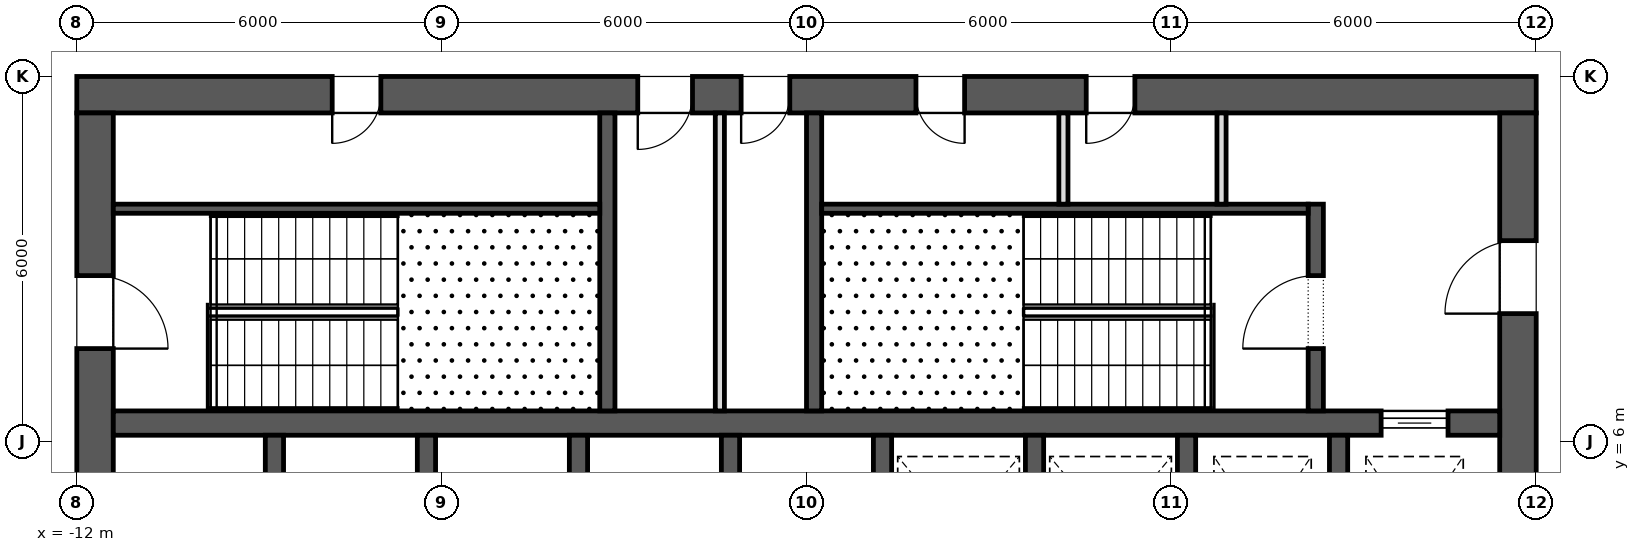
"""IFC4 building model, lengths in metres.
Left out: names, types, materials, properties, quantities, classifications, styles, units other than length and angle.
Written with IfcOpenShell. Run it as: python <this file> out.ifc"""

import sys

from ifc_helpers import new_model, si_unit, direction, frame, frame_2d, origin, place, context, subcontext, project, spatial, rectangle, extrude, element, fill, save


model = new_model("IFC4")
c1 = context("Model", 3, precision=1e-05, world=origin(), true_north=direction((0.0, 1.0)))
c2 = subcontext(c1, "Body", "Model", "MODEL_VIEW")
j1 = project(units=[si_unit("LENGTHUNIT", "METRE"), si_unit("PLANEANGLEUNIT", "RADIAN")], contexts=[c1])
p1 = place(None, origin())
s1 = spatial("IfcSite", under=j1, at=p1, CompositionType="ELEMENT")
p2 = place(p1, origin())
s2 = spatial("IfcBuilding", under=s1, at=p2, CompositionType="ELEMENT")
p3 = place(p2, frame((0.0, 0.0, 86.5)))
s3 = spatial("IfcBuildingStorey", under=s2, at=p3, CompositionType="ELEMENT", Elevation=86.5)
p4 = place(p3, frame((-12.0, 11.7, 0.0), z_axis=(0.0, 0.0, 1.0), x_axis=(1.0, 0.0, 0.0)))
e1 = element("IfcWall", 1, at=p4, inside=s3, PredefinedType="SHEAR", context=c2, shape_type="SweptSolid", body=[
    extrude(rectangle(XDim=24.0, YDim=0.6, at=frame_2d((12.0, 0.0))), origin(), (0.0, 0.0, 1.0), 4.2),
])
p5 = place(p4, frame((9.225, 0.0, 0.0)))
e2 = element("IfcOpeningElement", 2, at=p5, cuts=e1, PredefinedType="OPENING", context=c2, shape_type="SweptSolid", body=[
    extrude(rectangle(XDim=0.9, YDim=2.1, at=frame_2d((0.45, 1.05))), frame((0.0, 0.312, 0.0), z_axis=(0.0, -1.0, 0.0), x_axis=(1.0, 0.0, 0.0)), (0.0, 0.0, 1.0), 0.624),
])
p6 = place(p4, frame((10.925, 0.0, 0.0)))
e3 = element("IfcOpeningElement", 3, at=p6, cuts=e1, PredefinedType="OPENING", context=c2, shape_type="SweptSolid", body=[
    extrude(rectangle(XDim=0.8, YDim=2.1, at=frame_2d((0.4, 1.05))), frame((0.0, 0.312, 0.0), z_axis=(0.0, -1.0, 0.0), x_axis=(1.0, 0.0, 0.0)), (0.0, 0.0, 1.0), 0.624),
])
p7 = place(p4, frame((4.2, 0.0, 0.0)))
e4 = element("IfcOpeningElement", 4, at=p7, cuts=e1, PredefinedType="OPENING", context=c2, shape_type="SweptSolid", body=[
    extrude(rectangle(XDim=0.8, YDim=2.1, at=frame_2d((0.4, 1.05))), frame((0.0, 0.312, 0.0), z_axis=(0.0, -1.0, 0.0), x_axis=(1.0, 0.0, 0.0)), (0.0, 0.0, 1.0), 0.624),
])
p8 = place(p4, frame((13.8, 0.0, 0.0)))
e5 = element("IfcOpeningElement", 5, at=p8, cuts=e1, PredefinedType="OPENING", context=c2, shape_type="SweptSolid", body=[
    extrude(rectangle(XDim=0.8, YDim=2.1, at=frame_2d((0.4, 1.05))), frame((0.0, 0.312, 0.0), z_axis=(0.0, -1.0, 0.0), x_axis=(1.0, 0.0, 0.0)), (0.0, 0.0, 1.0), 0.624),
])
p9 = place(p4, frame((16.6, 0.0, 0.0)))
e6 = element("IfcOpeningElement", 6, at=p9, cuts=e1, PredefinedType="OPENING", context=c2, shape_type="SweptSolid", body=[
    extrude(rectangle(XDim=0.8, YDim=2.1, at=frame_2d((0.4, 1.05))), frame((0.0, 0.312, 0.0), z_axis=(0.0, -1.0, 0.0), x_axis=(1.0, 0.0, 0.0)), (0.0, 0.0, 1.0), 0.624),
])
p10 = place(p3, frame((11.7, -11.4, 0.0), z_axis=(0.0, 0.0, 1.0), x_axis=(0.0, 1.0, 0.0)))
e7 = element("IfcWall", 7, at=p10, inside=s3, PredefinedType="SHEAR", context=c2, shape_type="SweptSolid", body=[
    extrude(rectangle(XDim=22.8, YDim=0.6, at=frame_2d((11.4, 0.0))), origin(), (0.0, 0.0, 1.0), 4.2),
])
p11 = place(p10, frame((10.2, 0.0, 0.0)))
e8 = element("IfcOpeningElement", 8, at=p11, cuts=e7, PredefinedType="OPENING", context=c2, shape_type="SweptSolid", body=[
    extrude(rectangle(XDim=2.4, YDim=2.1, at=frame_2d((1.2, 1.05))), frame((0.0, 0.312, 0.0), z_axis=(0.0, -1.0, 0.0), x_axis=(1.0, 0.0, 0.0)), (0.0, 0.0, 1.0), 0.624),
])
p12 = place(p10, frame((19.5, 0.0, 0.0)))
e9 = element("IfcOpeningElement", 9, at=p12, cuts=e7, PredefinedType="OPENING", context=c2, shape_type="SweptSolid", body=[
    extrude(rectangle(XDim=1.2, YDim=2.1, at=frame_2d((0.6, 1.05))), frame((0.0, 0.312, 0.0), z_axis=(0.0, -1.0, 0.0), x_axis=(1.0, 0.0, 0.0)), (0.0, 0.0, 1.0), 0.624),
])
p13 = place(p10, frame((2.1, 0.0, 0.0)))
e10 = element("IfcOpeningElement", 10, at=p13, cuts=e7, PredefinedType="OPENING", context=c2, shape_type="SweptSolid", body=[
    extrude(rectangle(XDim=1.2, YDim=2.1, at=frame_2d((0.6, 1.05))), frame((0.0, 0.312, 0.0), z_axis=(0.0, -1.0, 0.0), x_axis=(1.0, 0.0, 0.0)), (0.0, 0.0, 1.0), 0.624),
])
p14 = place(p3, frame((-11.7, -11.4, 0.0), z_axis=(0.0, 0.0, 1.0), x_axis=(0.0, 1.0, 0.0)))
e11 = element("IfcWall", 11, at=p14, inside=s3, PredefinedType="SHEAR", context=c2, shape_type="SweptSolid", body=[
    extrude(rectangle(XDim=22.8, YDim=0.6, at=frame_2d((11.4, 0.0))), origin(), (0.0, 0.0, 1.0), 4.2),
])
p15 = place(p14, frame((10.2, 0.0, 0.0)))
e12 = element("IfcOpeningElement", 12, at=p15, cuts=e11, PredefinedType="OPENING", context=c2, shape_type="SweptSolid", body=[
    extrude(rectangle(XDim=2.4, YDim=2.1, at=frame_2d((1.2, 1.05))), frame((0.0, 0.312, 0.0), z_axis=(0.0, -1.0, 0.0), x_axis=(1.0, 0.0, 0.0)), (0.0, 0.0, 1.0), 0.624),
])
p16 = place(p14, frame((18.925, 0.0, 0.0)))
e13 = element("IfcOpeningElement", 13, at=p16, cuts=e11, PredefinedType="OPENING", context=c2, shape_type="SweptSolid", body=[
    extrude(rectangle(XDim=1.2, YDim=2.1, at=frame_2d((0.6, 1.05))), frame((0.0, 0.312, 0.0), z_axis=(0.0, -1.0, 0.0), x_axis=(1.0, 0.0, 0.0)), (0.0, 0.0, 1.0), 0.624),
])
p17 = place(p14, frame((2.675, 0.0, 0.0)))
e14 = element("IfcOpeningElement", 14, at=p17, cuts=e11, PredefinedType="OPENING", context=c2, shape_type="SweptSolid", body=[
    extrude(rectangle(XDim=1.2, YDim=2.1, at=frame_2d((0.6, 1.05))), frame((0.0, 0.312, 0.0), z_axis=(0.0, -1.0, 0.0), x_axis=(1.0, 0.0, 0.0)), (0.0, 0.0, 1.0), 0.624),
])
p18 = place(p3, frame((-11.4, 6.3, 0.0), z_axis=(0.0, 0.0, 1.0), x_axis=(1.0, 0.0, 0.0)))
e15 = element("IfcWall", 15, at=p18, inside=s3, PredefinedType="SHEAR", context=c2, shape_type="SweptSolid", body=[
    extrude(rectangle(XDim=22.8, YDim=0.4, at=frame_2d((11.4, 0.0))), origin(), (0.0, 0.0, 1.0), 4.2),
])
p19 = place(p18, frame((20.85, 0.0, 0.0)))
e16 = element("IfcOpeningElement", 16, at=p19, cuts=e15, PredefinedType="OPENING", context=c2, shape_type="SweptSolid", body=[
    extrude(rectangle(XDim=1.1, YDim=2.1, at=frame_2d((0.55, 1.05))), frame((0.0, 0.212, 0.0), z_axis=(0.0, -1.0, 0.0), x_axis=(1.0, 0.0, 0.0)), (0.0, 0.0, 1.0), 0.424),
])
for number, where, z_axis, x_axis in (
    (17, (-8.75, 3.2, 0.0), (0.0, 0.0, 1.0), (0.0, 1.0, 0.0)),
    (18, (-6.25, 3.2, 0.0), (0.0, 0.0, 1.0), (0.0, 1.0, 0.0)),
    (19, (-3.75, 3.2, 0.0), (0.0, 0.0, 1.0), (0.0, 1.0, 0.0)),
    (20, (-1.25, 3.2, 0.0), (0.0, 0.0, 1.0), (0.0, 1.0, 0.0)),
    (21, (1.25, 3.2, 0.0), (0.0, 0.0, 1.0), (0.0, 1.0, 0.0)),
    (22, (3.75, 3.2, 0.0), (0.0, 0.0, 1.0), (0.0, 1.0, 0.0)),
    (23, (6.25, 3.2, 0.0), (0.0, 0.0, 1.0), (0.0, 1.0, 0.0)),
    (24, (8.75, 3.2, 0.0), (0.0, 0.0, 1.0), (0.0, 1.0, 0.0)),
):
    element("IfcWall", number, at=place(p3, frame(where, z_axis=z_axis, x_axis=x_axis)), inside=s3, PredefinedType="SHEAR", context=c2, shape_type="SweptSolid", body=[
        extrude(rectangle(XDim=2.9, YDim=0.3, at=frame_2d((1.45, 0.0))), origin(), (0.0, 0.0, 1.0), 4.2),
    ])
for number, where, z_axis, x_axis in (
    (25, (-3.275, 6.5, 0.0), (0.0, 0.0, 1.0), (0.0, 1.0, 0.0)),
    (26, (0.125, 6.5, 0.0), (0.0, 0.0, 1.0), (0.0, 1.0, 0.0)),
):
    element("IfcWall", number, at=place(p3, frame(where, z_axis=z_axis, x_axis=x_axis)), inside=s3, PredefinedType="SHEAR", context=c2, shape_type="SweptSolid", body=[
        extrude(rectangle(XDim=4.9, YDim=0.25, at=frame_2d((2.45, 0.0))), origin(), (0.0, 0.0, 1.0), 3.9),
    ])
p20 = place(p3, frame((8.375, 6.5, 0.0), z_axis=(0.0, 0.0, 1.0), x_axis=(0.0, 1.0, 0.0)))
e27 = element("IfcWall", 27, at=p20, inside=s3, PredefinedType="SHEAR", context=c2, shape_type="SweptSolid", body=[
    extrude(rectangle(XDim=3.4, YDim=0.25, at=frame_2d((1.7, 0.0))), origin(), (0.0, 0.0, 1.0), 3.9),
])
p21 = place(p20, frame((1.025, 0.0, 0.0)))
e28 = element("IfcOpeningElement", 28, at=p21, cuts=e27, PredefinedType="OPENING", context=c2, shape_type="SweptSolid", body=[
    extrude(rectangle(XDim=1.2, YDim=2.1, at=frame_2d((0.6, 1.05))), frame((0.0, 0.137, 0.0), z_axis=(0.0, -1.0, 0.0), x_axis=(1.0, 0.0, 0.0)), (0.0, 0.0, 1.0), 0.274),
])
for number, where, z_axis, x_axis in (
    (29, (-11.4, 9.825, 0.0), (0.0, 0.0, 1.0), (1.0, 0.0, 0.0)),
    (30, (0.25, 9.825, 0.0), (0.0, 0.0, 1.0), (1.0, 0.0, 0.0)),
):
    element("IfcWall", number, at=place(p3, frame(where, z_axis=z_axis, x_axis=x_axis)), inside=s3, PredefinedType="SHEAR", context=c2, shape_type="SweptSolid", body=[
        extrude(rectangle(XDim=8.0, YDim=0.15, at=frame_2d((4.0, 0.0))), origin(), (0.0, 0.0, 1.0), 3.9),
    ])
p22 = place(p3, frame((-1.425, 6.5, 0.0), z_axis=(0.0, 0.0, 1.0), x_axis=(0.0, 1.0, 0.0)))
e31 = element("IfcWall", 31, at=p22, inside=s3, PredefinedType="PARTITIONING", context=c2, shape_type="SweptSolid", body=[
    extrude(rectangle(XDim=4.9, YDim=0.15, at=frame_2d((2.45, 0.0))), origin(), (0.0, 0.0, 1.0), 3.9),
])
for number, where, z_axis, x_axis in (
    (32, (4.225, 9.9, 0.0), (0.0, 0.0, 1.0), (0.0, 1.0, 0.0)),
    (33, (6.825, 9.9, 0.0), (0.0, 0.0, 1.0), (0.0, 1.0, 0.0)),
):
    element("IfcWall", number, at=place(p3, frame(where, z_axis=z_axis, x_axis=x_axis)), inside=s3, PredefinedType="PARTITIONING", context=c2, shape_type="SweptSolid", body=[
        extrude(rectangle(XDim=1.5, YDim=0.15, at=frame_2d((0.75, 0.0))), origin(), (0.0, 0.0, 1.0), 3.9),
    ])
p23 = place(p19, origin())
e34 = element("IfcDoor", 34, at=p23, inside=s3, OperationType="SLIDING_TO_LEFT", PredefinedType="DOOR", context=c2, shape_type="SweptSolid", body=[
    extrude(rectangle(XDim=1.1, YDim=2.1, at=frame_2d((0.55, 1.05))), frame((0.0, 0.025, 0.0), z_axis=(0.0, -1.0, 0.0), x_axis=(1.0, 0.0, 0.0)), (0.0, 0.0, 1.0), 0.05),
])
fill(e16, e34)
p24 = place(p16, frame((1.2, 0.0, 0.0), z_axis=(0.0, 0.0, 1.0), x_axis=(-1.0, 0.0, 0.0)))
e35 = element("IfcDoor", 35, at=p24, inside=s3, OperationType="SINGLE_SWING_LEFT", PredefinedType="DOOR", context=c2, shape_type="SweptSolid", body=[
    extrude(rectangle(XDim=1.2, YDim=2.1, at=frame_2d((0.6, 1.05))), frame((0.0, 0.025, 0.0), z_axis=(0.0, -1.0, 0.0), x_axis=(1.0, 0.0, 0.0)), (0.0, 0.0, 1.0), 0.05),
])
fill(e13, e35)
p25 = place(p21, origin())
e36 = element("IfcDoor", 36, at=p25, inside=s3, OperationType="SINGLE_SWING_RIGHT", PredefinedType="DOOR", context=c2, shape_type="SweptSolid", body=[
    extrude(rectangle(XDim=1.2, YDim=2.1, at=frame_2d((0.6, 1.05))), frame((0.0, 0.025, 0.0), z_axis=(0.0, -1.0, 0.0), x_axis=(1.0, 0.0, 0.0)), (0.0, 0.0, 1.0), 0.05),
])
fill(e28, e36)
p26 = place(p12, origin())
e37 = element("IfcDoor", 37, at=p26, inside=s3, OperationType="SINGLE_SWING_RIGHT", PredefinedType="DOOR", context=c2, shape_type="SweptSolid", body=[
    extrude(rectangle(XDim=1.2, YDim=2.1, at=frame_2d((0.6, 1.05))), frame((0.0, 0.025, 0.0), z_axis=(0.0, -1.0, 0.0), x_axis=(1.0, 0.0, 0.0)), (0.0, 0.0, 1.0), 0.05),
])
fill(e9, e37)
p27 = place(p5, frame((0.9, 0.0, 0.0), z_axis=(0.0, 0.0, 1.0), x_axis=(-1.0, 0.0, 0.0)))
e38 = element("IfcDoor", 38, at=p27, inside=s3, OperationType="SINGLE_SWING_LEFT", PredefinedType="DOOR", context=c2, shape_type="SweptSolid", body=[
    extrude(rectangle(XDim=0.9, YDim=2.1, at=frame_2d((0.45, 1.05))), frame((0.0, 0.025, 0.0), z_axis=(0.0, -1.0, 0.0), x_axis=(1.0, 0.0, 0.0)), (0.0, 0.0, 1.0), 0.05),
])
fill(e2, e38)
p28 = place(p6, frame((0.8, 0.0, 0.0), z_axis=(0.0, 0.0, 1.0), x_axis=(-1.0, 0.0, 0.0)))
e39 = element("IfcDoor", 39, at=p28, inside=s3, OperationType="SINGLE_SWING_LEFT", PredefinedType="DOOR", context=c2, shape_type="SweptSolid", body=[
    extrude(rectangle(XDim=0.8, YDim=2.1, at=frame_2d((0.4, 1.05))), frame((0.0, 0.025, 0.0), z_axis=(0.0, -1.0, 0.0), x_axis=(1.0, 0.0, 0.0)), (0.0, 0.0, 1.0), 0.05),
])
fill(e3, e39)
p29 = place(p7, frame((0.8, 0.0, 0.0), z_axis=(0.0, 0.0, 1.0), x_axis=(-1.0, 0.0, 0.0)))
e40 = element("IfcDoor", 40, at=p29, inside=s3, OperationType="SINGLE_SWING_LEFT", PredefinedType="DOOR", context=c2, shape_type="SweptSolid", body=[
    extrude(rectangle(XDim=0.8, YDim=2.1, at=frame_2d((0.4, 1.05))), frame((0.0, 0.025, 0.0), z_axis=(0.0, -1.0, 0.0), x_axis=(1.0, 0.0, 0.0)), (0.0, 0.0, 1.0), 0.05),
])
fill(e4, e40)
p30 = place(p8, frame((0.8, 0.0, 0.0), z_axis=(0.0, 0.0, 1.0), x_axis=(-1.0, 0.0, 0.0)))
e41 = element("IfcDoor", 41, at=p30, inside=s3, OperationType="SINGLE_SWING_RIGHT", PredefinedType="DOOR", context=c2, shape_type="SweptSolid", body=[
    extrude(rectangle(XDim=0.8, YDim=2.1, at=frame_2d((0.4, 1.05))), frame((0.0, 0.025, 0.0), z_axis=(0.0, -1.0, 0.0), x_axis=(1.0, 0.0, 0.0)), (0.0, 0.0, 1.0), 0.05),
])
fill(e5, e41)
p31 = place(p9, frame((0.8, 0.0, 0.0), z_axis=(0.0, 0.0, 1.0), x_axis=(-1.0, 0.0, 0.0)))
e42 = element("IfcDoor", 42, at=p31, inside=s3, OperationType="SINGLE_SWING_LEFT", PredefinedType="DOOR", context=c2, shape_type="SweptSolid", body=[
    extrude(rectangle(XDim=0.8, YDim=2.1, at=frame_2d((0.4, 1.05))), frame((0.0, 0.025, 0.0), z_axis=(0.0, -1.0, 0.0), x_axis=(1.0, 0.0, 0.0)), (0.0, 0.0, 1.0), 0.05),
])
fill(e6, e42)
save(model, sys.argv[1])
